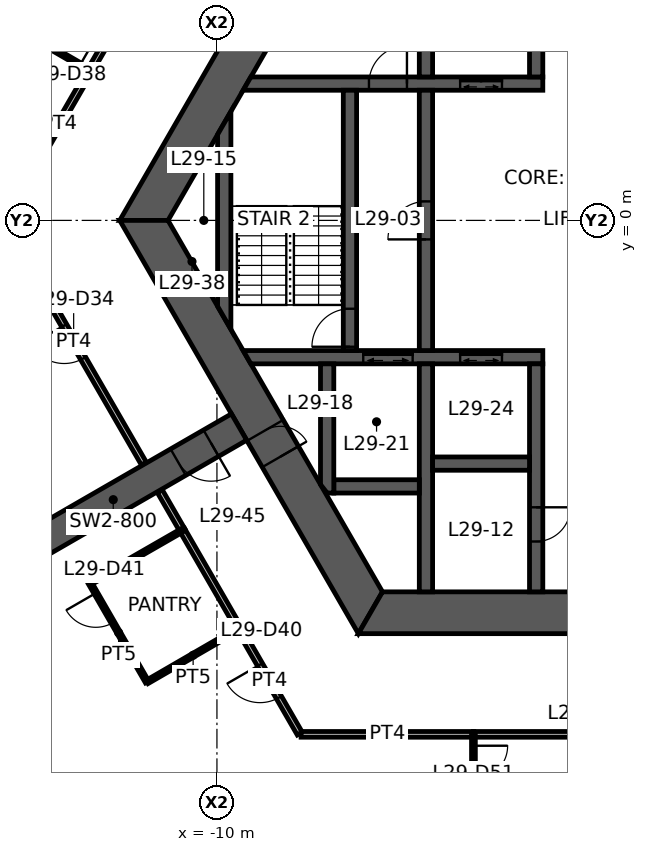
"""IFC4 building model, lengths in metres.
Left out: names, types, materials, properties, quantities, classifications, styles, units other than length and angle.
Written with IfcOpenShell. Run it as: python <this file> out.ifc"""

import sys

from ifc_helpers import new_model, si_unit, direction, frame, frame_2d, origin, place, context, subcontext, project, spatial, polyline, rectangle, outline, extrude, element, fill, save


model = new_model("IFC4")
c1 = context("Model", 3, precision=1e-05, world=origin(), true_north=direction((0.0, 1.0)))
c2 = subcontext(c1, "Body", "Model", "MODEL_VIEW")
j1 = project(units=[si_unit("LENGTHUNIT", "METRE"), si_unit("PLANEANGLEUNIT", "RADIAN")], contexts=[c1])
p1 = place(None, origin())
s1 = spatial("IfcSite", under=j1, at=p1, CompositionType="ELEMENT")
p2 = place(p1, origin())
s2 = spatial("IfcBuilding", under=s1, at=p2, CompositionType="ELEMENT")
p3 = place(p2, frame((0.0, 0.0, 115.8)))
s3 = spatial("IfcBuildingStorey", under=s2, at=p3, CompositionType="ELEMENT", Elevation=115.8)
p4 = place(p3, frame((-5.961, 10.325, 0.0), z_axis=(0.0, 0.0, 1.0), x_axis=(-0.500004296715, -0.866022923061, 0.0)))
e1 = element("IfcWall", 1, at=p4, inside=s3, PredefinedType="SHEAR", context=c2, shape_type="SweptSolid", body=[
    extrude(outline(polyline([(-0.318, -0.55), (4.494, -0.55), (5.494, -0.55), (12.24, -0.55), (11.605, 0.55), (5.494, 0.55), (4.494, 0.55), (0.318, 0.55), (-0.318, -0.55)])), origin(), (0.0, 0.0, 1.0), 3.9),
])
p5 = place(p4, frame((4.494, 0.0, 0.0)))
e2 = element("IfcOpeningElement", 2, at=p5, cuts=e1, PredefinedType="OPENING", context=c2, shape_type="SweptSolid", body=[
    extrude(rectangle(XDim=1.0, YDim=2.1, at=frame_2d((0.5, 1.05))), frame((0.0, 0.56, 0.0), z_axis=(0.0, -1.0, 0.0), x_axis=(1.0, 0.0, 0.0)), (0.0, 0.0, 1.0), 1.12),
])
p6 = place(p3, frame((-11.922, 0.0, 0.0), z_axis=(0.0, 0.0, 1.0), x_axis=(0.500004296715, -0.866022923061, 0.0)))
e3 = element("IfcWall", 3, at=p6, inside=s3, PredefinedType="SHEAR", context=c2, shape_type="SweptSolid", body=[
    extrude(outline(polyline([(-0.318, -0.55), (6.381, -0.55), (7.181, -0.55), (12.24, -0.55), (11.605, 0.55), (7.181, 0.55), (6.381, 0.55), (0.318, 0.55), (-0.318, -0.55)])), origin(), (0.0, 0.0, 1.0), 3.9),
])
p7 = place(p6, frame((6.381, 0.0, 0.0)))
e4 = element("IfcOpeningElement", 4, at=p7, cuts=e3, PredefinedType="OPENING", context=c2, shape_type="SweptSolid", body=[
    extrude(rectangle(XDim=0.8, YDim=2.1, at=frame_2d((0.4, 1.05))), frame((0.0, 0.56, 0.0), z_axis=(0.0, -1.0, 0.0), x_axis=(1.0, 0.0, 0.0)), (0.0, 0.0, 1.0), 1.12),
])
p8 = place(p3, frame((-5.961, -10.325, 0.0), z_axis=(0.0, 0.0, 1.0), x_axis=(1.0, 0.0, 0.0)))
e5 = element("IfcWall", 5, at=p8, inside=s3, PredefinedType="SHEAR", context=c2, shape_type="SweptSolid", body=[
    extrude(outline(polyline([(-0.318, -0.55), (5.461, -0.55), (6.461, -0.55), (12.24, -0.55), (11.605, 0.55), (6.461, 0.55), (5.461, 0.55), (0.318, 0.55), (-0.318, -0.55)])), origin(), (0.0, 0.0, 1.0), 3.9),
])
p9 = place(p8, frame((5.461, 0.0, 0.0)))
e6 = element("IfcOpeningElement", 6, at=p9, cuts=e5, PredefinedType="OPENING", context=c2, shape_type="SweptSolid", body=[
    extrude(rectangle(XDim=1.0, YDim=2.1, at=frame_2d((0.5, 1.05))), frame((0.0, 0.56, 0.0), z_axis=(0.0, -1.0, 0.0), x_axis=(1.0, 0.0, 0.0)), (0.0, 0.0, 1.0), 1.12),
])
p10 = place(p3, frame((-9.418, -5.438, 0.0), z_axis=(0.0, 0.0, 1.0), x_axis=(-0.866029782078, -0.499992416496, 0.0)))
e7 = element("IfcWall", 7, at=p10, inside=s3, PredefinedType="SHEAR", context=c2, shape_type="SweptSolid", body=[
    extrude(rectangle(XDim=7.646, YDim=0.8, at=frame_2d((3.823, 0.0))), origin(), (0.0, 0.0, 1.0), 3.9),
])
p11 = place(p10, frame((0.85, 0.0, 0.0)))
e8 = element("IfcOpeningElement", 8, at=p11, cuts=e7, PredefinedType="OPENING", context=c2, shape_type="SweptSolid", body=[
    extrude(rectangle(XDim=1.0, YDim=2.1, at=frame_2d((0.5, 1.05))), frame((0.0, 0.41, 0.0), z_axis=(0.0, -1.0, 0.0), x_axis=(1.0, 0.0, 0.0)), (0.0, 0.0, 1.0), 0.82),
])
p12 = place(p3, frame((-9.209, 3.6, 0.0), z_axis=(0.0, 0.0, 1.0), x_axis=(1.0, 0.0, 0.0)))
e9 = element("IfcWall", 9, at=p12, inside=s3, PredefinedType="SHEAR", context=c2, shape_type="SweptSolid", body=[
    extrude(outline(polyline([(-0.101, -0.175), (3.209, -0.175), (4.209, -0.175), (5.609, -0.175), (6.709, -0.175), (7.784, -0.175), (7.784, 0.175), (6.709, 0.175), (5.609, 0.175), (4.209, 0.175), (3.209, 0.175), (0.101, 0.175), (-0.101, -0.175)])), origin(), (0.0, 0.0, 1.0), 3.9),
])
p13 = place(p12, frame((3.209, 0.0, 0.0)))
e10 = element("IfcOpeningElement", 10, at=p13, cuts=e9, PredefinedType="OPENING", context=c2, shape_type="SweptSolid", body=[
    extrude(rectangle(XDim=1.0, YDim=2.1, at=frame_2d((0.5, 1.05))), frame((0.0, 0.185, 0.0), z_axis=(0.0, -1.0, 0.0), x_axis=(1.0, 0.0, 0.0)), (0.0, 0.0, 1.0), 0.37),
])
p14 = place(p12, frame((5.609, 0.0, 0.0)))
e11 = element("IfcOpeningElement", 11, at=p14, cuts=e9, PredefinedType="OPENING", context=c2, shape_type="SweptSolid", body=[
    extrude(rectangle(XDim=1.1, YDim=2.1, at=frame_2d((0.55, 1.05))), frame((0.0, 0.185, 0.0), z_axis=(0.0, -1.0, 0.0), x_axis=(1.0, 0.0, 0.0)), (0.0, 0.0, 1.0), 0.37),
])
p15 = place(p3, frame((-9.209, -3.6, 0.0), z_axis=(0.0, 0.0, 1.0), x_axis=(1.0, 0.0, 0.0)))
e12 = element("IfcWall", 12, at=p15, inside=s3, PredefinedType="SHEAR", context=c2, shape_type="SweptSolid", body=[
    extrude(outline(polyline([(0.101, -0.175), (3.059, -0.175), (4.359, -0.175), (5.609, -0.175), (6.709, -0.175), (7.784, -0.175), (7.784, 0.175), (6.709, 0.175), (5.609, 0.175), (4.359, 0.175), (3.059, 0.175), (-0.101, 0.175), (0.101, -0.175)])), origin(), (0.0, 0.0, 1.0), 3.9),
])
p16 = place(p15, frame((5.609, 0.0, 0.0)))
e13 = element("IfcOpeningElement", 13, at=p16, cuts=e12, PredefinedType="OPENING", context=c2, shape_type="SweptSolid", body=[
    extrude(rectangle(XDim=1.1, YDim=2.1, at=frame_2d((0.55, 1.05))), frame((0.0, 0.185, 0.0), z_axis=(0.0, -1.0, 0.0), x_axis=(1.0, 0.0, 0.0)), (0.0, 0.0, 1.0), 0.37),
])
p17 = place(p15, frame((3.059, 0.0, 0.0)))
e14 = element("IfcOpeningElement", 14, at=p17, cuts=e12, PredefinedType="OPENING", context=c2, shape_type="SweptSolid", body=[
    extrude(rectangle(XDim=1.3, YDim=2.1, at=frame_2d((0.65, 1.05))), frame((0.0, 0.185, 0.0), z_axis=(0.0, -1.0, 0.0), x_axis=(1.0, 0.0, 0.0)), (0.0, 0.0, 1.0), 0.37),
])
p18 = place(p3, frame((-1.6, 3.775, 0.0), z_axis=(0.0, 0.0, 1.0), x_axis=(0.0, 1.0, 0.0)))
e15 = element("IfcWall", 15, at=p18, inside=s3, PredefinedType="SHEAR", context=c2, shape_type="SweptSolid", body=[
    extrude(rectangle(XDim=6.0, YDim=0.35, at=frame_2d((3.0, 0.0))), origin(), (0.0, 0.0, 1.0), 3.9),
])
p19 = place(p18, frame((3.775, 0.0, 0.0)))
e16 = element("IfcOpeningElement", 16, at=p19, cuts=e15, PredefinedType="OPENING", context=c2, shape_type="SweptSolid", body=[
    extrude(rectangle(XDim=0.9, YDim=2.1, at=frame_2d((0.45, 1.05))), frame((0.0, 0.185, 0.0), z_axis=(0.0, -1.0, 0.0), x_axis=(1.0, 0.0, 0.0)), (0.0, 0.0, 1.0), 0.37),
])
p20 = place(p3, frame((-1.6, -3.775, 0.0), z_axis=(0.0, 0.0, 1.0), x_axis=(0.0, -1.0, 0.0)))
e17 = element("IfcWall", 17, at=p20, inside=s3, PredefinedType="SHEAR", context=c2, shape_type="SweptSolid", body=[
    extrude(rectangle(XDim=6.0, YDim=0.35, at=frame_2d((3.0, 0.0))), origin(), (0.0, 0.0, 1.0), 3.9),
])
p21 = place(p20, frame((3.775, 0.0, 0.0)))
e18 = element("IfcOpeningElement", 18, at=p21, cuts=e17, PredefinedType="OPENING", context=c2, shape_type="SweptSolid", body=[
    extrude(rectangle(XDim=0.9, YDim=2.1, at=frame_2d((0.45, 1.05))), frame((0.0, 0.185, 0.0), z_axis=(0.0, -1.0, 0.0), x_axis=(1.0, 0.0, 0.0)), (0.0, 0.0, 1.0), 0.37),
])
p22 = place(p3, frame((-4.5, -3.425, 0.0), z_axis=(0.0, 0.0, 1.0), x_axis=(0.0, 1.0, 0.0)))
e19 = element("IfcWall", 19, at=p22, inside=s3, PredefinedType="SHEAR", context=c2, shape_type="SweptSolid", body=[
    extrude(rectangle(XDim=6.85, YDim=0.35, at=frame_2d((3.425, 0.0))), origin(), (0.0, 0.0, 1.0), 3.9),
])
p23 = place(p22, frame((2.925, 0.0, 0.0)))
e20 = element("IfcOpeningElement", 20, at=p23, cuts=e19, PredefinedType="OPENING", context=c2, shape_type="SweptSolid", body=[
    extrude(rectangle(XDim=1.0, YDim=2.1, at=frame_2d((0.5, 1.05))), frame((0.0, 0.185, 0.0), z_axis=(0.0, -1.0, 0.0), x_axis=(1.0, 0.0, 0.0)), (0.0, 0.0, 1.0), 0.37),
])
p24 = place(p3, frame((-6.5, -3.425, 0.0), z_axis=(0.0, 0.0, 1.0), x_axis=(0.0, 1.0, 0.0)))
e21 = element("IfcWall", 21, at=p24, inside=s3, PredefinedType="SHEAR", context=c2, shape_type="SweptSolid", body=[
    extrude(rectangle(XDim=6.85, YDim=0.35, at=frame_2d((3.425, 0.0))), origin(), (0.0, 0.0, 1.0), 3.9),
])
p25 = place(p24, frame((0.1, 0.0, 0.0)))
e22 = element("IfcOpeningElement", 22, at=p25, cuts=e21, PredefinedType="OPENING", context=c2, shape_type="SweptSolid", body=[
    extrude(rectangle(XDim=1.0, YDim=2.1, at=frame_2d((0.5, 1.05))), frame((0.0, 0.185, 0.0), z_axis=(0.0, -1.0, 0.0), x_axis=(1.0, 0.0, 0.0)), (0.0, 0.0, 1.0), 0.37),
])
for number, where, z_axis, x_axis in (
    (23, (-4.5, 3.775, 0.0), (0.0, 0.0, 1.0), (0.0, 1.0, 0.0)),
    (24, (-4.5, -3.775, 0.0), (0.0, 0.0, 1.0), (0.0, -1.0, 0.0)),
):
    element("IfcWall", number, at=place(p3, frame(where, z_axis=z_axis, x_axis=x_axis)), inside=s3, PredefinedType="SHEAR", context=c2, shape_type="SweptSolid", body=[
        extrude(rectangle(XDim=6.0, YDim=0.35, at=frame_2d((3.0, 0.0))), origin(), (0.0, 0.0, 1.0), 3.9),
    ])
p26 = place(p3, frame((-4.325, -6.4, 0.0), z_axis=(0.0, 0.0, 1.0), x_axis=(1.0, 0.0, 0.0)))
e25 = element("IfcWall", 25, at=p26, inside=s3, PredefinedType="SHEAR", context=c2, shape_type="SweptSolid", body=[
    extrude(rectangle(XDim=2.55, YDim=0.35, at=frame_2d((1.275, 0.0))), origin(), (0.0, 0.0, 1.0), 3.9),
])
p27 = place(p3, frame((-6.925, -7.0, 0.0), z_axis=(0.0, 0.0, 1.0), x_axis=(1.0, 0.0, 0.0)))
e26 = element("IfcWall", 26, at=p27, inside=s3, PredefinedType="SHEAR", context=c2, shape_type="SweptSolid", body=[
    extrude(rectangle(XDim=2.25, YDim=0.35, at=frame_2d((1.125, 0.0))), origin(), (0.0, 0.0, 1.0), 3.9),
])
p28 = place(p3, frame((-7.1, -3.775, 0.0), z_axis=(0.0, 0.0, 1.0), x_axis=(0.0, -1.0, 0.0)))
e27 = element("IfcWall", 27, at=p28, inside=s3, PredefinedType="SHEAR", context=c2, shape_type="SweptSolid", body=[
    extrude(outline(polyline([(0.0, -0.175), (3.175, -0.175), (3.4, 0.0), (3.4, 0.175), (0.0, 0.175), (0.0, -0.175)])), origin(), (0.0, 0.0, 1.0), 3.9),
])
p29 = place(p3, frame((-9.808, -2.562, 0.0), z_axis=(0.0, 0.0, 1.0), x_axis=(0.0, 1.0, 0.0)))
e28 = element("IfcWall", 28, at=p29, inside=s3, PredefinedType="SHEAR", context=c2, shape_type="SweptSolid", body=[
    extrude(outline(polyline([(-0.303, -0.175), (5.428, -0.175), (4.821, 0.175), (0.303, 0.175), (-0.303, -0.175)])), origin(), (0.0, 0.0, 1.0), 3.9),
])
p30 = place(p3, frame((-14.962, 1.135, 0.0), z_axis=(0.0, 0.0, 1.0), x_axis=(0.500001520505, 0.866024525919, 0.0)))
e29 = element("IfcWall", 29, at=p30, inside=s3, PredefinedType="PARTITIONING", context=c2, shape_type="SweptSolid", body=[
    extrude(rectangle(XDim=3.256, YDim=0.15, at=frame_2d((1.628, 0.0))), origin(), (0.0, 0.0, 1.0), 2.95),
])
p31 = place(p3, frame((-11.923, -6.399, 0.0), z_axis=(0.0, 0.0, 1.0), x_axis=(-0.499980837837, 0.866036466782, 0.0)))
e30 = element("IfcWall", 30, at=p31, inside=s3, PredefinedType="PARTITIONING", context=c2, shape_type="SweptSolid", body=[
    extrude(rectangle(XDim=7.388, YDim=0.15, at=frame_2d((3.694, 0.0))), origin(), (0.0, 0.0, 1.0), 2.95),
])
p32 = place(p31, frame((3.194, 0.0, 0.0)))
e31 = element("IfcOpeningElement", 31, at=p32, cuts=e30, PredefinedType="OPENING", context=c2, shape_type="SweptSolid", body=[
    extrude(rectangle(XDim=1.0, YDim=2.1, at=frame_2d((0.5, 1.05))), frame((0.0, 0.085, 0.0), z_axis=(0.0, -1.0, 0.0), x_axis=(1.0, 0.0, 0.0)), (0.0, 0.0, 1.0), 0.17),
])
p33 = place(p3, frame((-13.338, 3.947, 0.0), z_axis=(0.0, 0.0, 1.0), x_axis=(0.49998791073, 0.866032383415, 0.0)))
e32 = element("IfcWall", 32, at=p33, inside=s3, PredefinedType="PARTITIONING", context=c2, shape_type="SweptSolid", body=[
    extrude(rectangle(XDim=6.502, YDim=0.15, at=frame_2d((3.251, 0.0))), origin(), (0.0, 0.0, 1.0), 2.95),
])
p34 = place(p33, frame((2.751, 0.0, 0.0)))
e33 = element("IfcOpeningElement", 33, at=p34, cuts=e32, PredefinedType="OPENING", context=c2, shape_type="SweptSolid", body=[
    extrude(rectangle(XDim=1.0, YDim=2.1, at=frame_2d((0.5, 1.05))), frame((0.0, 0.085, 0.0), z_axis=(0.0, -1.0, 0.0), x_axis=(1.0, 0.0, 0.0)), (0.0, 0.0, 1.0), 0.17),
])
p35 = place(p3, frame((-17.056, 6.099, 0.0), z_axis=(0.0, 0.0, 1.0), x_axis=(0.865505397626, -0.500899597405, 0.0)))
e34 = element("IfcWall", 34, at=p35, inside=s3, PredefinedType="PARTITIONING", context=c2, shape_type="SweptSolid", body=[
    extrude(rectangle(XDim=4.295, YDim=0.1, at=frame_2d((2.148, 0.0))), origin(), (0.0, 0.0, 1.0), 2.95),
])
p36 = place(p35, frame((3.095, 0.0, 0.0)))
e35 = element("IfcOpeningElement", 35, at=p36, cuts=e34, PredefinedType="OPENING", context=c2, shape_type="SweptSolid", body=[
    extrude(rectangle(XDim=0.9, YDim=2.1, at=frame_2d((0.45, 1.05))), frame((0.0, 0.06, 0.0), z_axis=(0.0, -1.0, 0.0), x_axis=(1.0, 0.0, 0.0)), (0.0, 0.0, 1.0), 0.12),
])
p37 = place(p3, frame((-9.41, -10.75, 0.0), z_axis=(0.0, 0.0, 1.0), x_axis=(-0.500038395149, 0.8660032352, 0.0)))
e36 = element("IfcWall", 36, at=p37, inside=s3, PredefinedType="PARTITIONING", context=c2, shape_type="SweptSolid", body=[
    extrude(rectangle(XDim=3.01, YDim=0.15, at=frame_2d((1.505, 0.0))), origin(), (0.0, 0.0, 1.0), 2.95),
])
p38 = place(p3, frame((-10.911, -8.152, 0.0), z_axis=(0.0, 0.0, 1.0), x_axis=(-0.499841408252, 0.866116947413, 0.0)))
e37 = element("IfcWall", 37, at=p38, inside=s3, PredefinedType="PARTITIONING", context=c2, shape_type="SweptSolid", body=[
    extrude(rectangle(XDim=1.185, YDim=0.15, at=frame_2d((0.592, 0.0))), origin(), (0.0, 0.0, 1.0), 2.95),
])
p39 = place(p3, frame((-7.82, -13.505, 0.0), z_axis=(0.0, 0.0, 1.0), x_axis=(-0.499983030129, 0.866035201123, 0.0)))
e38 = element("IfcWall", 38, at=p39, inside=s3, PredefinedType="PARTITIONING", context=c2, shape_type="SweptSolid", body=[
    extrude(rectangle(XDim=3.19, YDim=0.15, at=frame_2d((1.595, 0.0))), origin(), (0.0, 0.0, 1.0), 2.95),
])
p40 = place(p39, frame((1.095, 0.0, 0.0)))
e39 = element("IfcOpeningElement", 39, at=p40, cuts=e38, PredefinedType="OPENING", context=c2, shape_type="SweptSolid", body=[
    extrude(rectangle(XDim=1.0, YDim=2.1, at=frame_2d((0.5, 1.05))), frame((0.0, 0.085, 0.0), z_axis=(0.0, -1.0, 0.0), x_axis=(1.0, 0.0, 0.0)), (0.0, 0.0, 1.0), 0.17),
])
p41 = place(p3, frame((-13.338, -9.548, 0.0), z_axis=(0.0, 0.0, 1.0), x_axis=(0.866833758708, 0.498597267105, 0.0)))
e40 = element("IfcWall", 40, at=p41, inside=s3, PredefinedType="PARTITIONING", context=c2, shape_type="SweptSolid", body=[
    extrude(rectangle(XDim=2.8, YDim=0.1, at=frame_2d((1.4, 0.0))), origin(), (0.0, 0.0, 1.0), 2.95),
])
p42 = place(p3, frame((-11.838, -12.146, 0.0), z_axis=(0.0, 0.0, 1.0), x_axis=(-0.499990139034, 0.866031096941, 0.0)))
e41 = element("IfcWall", 41, at=p42, inside=s3, PredefinedType="PARTITIONING", context=c2, shape_type="SweptSolid", body=[
    extrude(rectangle(XDim=3.0, YDim=0.1, at=frame_2d((1.5, 0.0))), origin(), (0.0, 0.0, 1.0), 2.95),
])
p43 = place(p42, frame((1.8, 0.0, 0.0)))
e42 = element("IfcOpeningElement", 42, at=p43, cuts=e41, PredefinedType="OPENING", context=c2, shape_type="SweptSolid", body=[
    extrude(rectangle(XDim=0.9, YDim=2.1, at=frame_2d((0.45, 1.05))), frame((0.0, 0.06, 0.0), z_axis=(0.0, -1.0, 0.0), x_axis=(1.0, 0.0, 0.0)), (0.0, 0.0, 1.0), 0.12),
])
p44 = place(p3, frame((-9.415, -10.742, 0.0), z_axis=(0.0, 0.0, 1.0), x_axis=(-0.865195372903, -0.501434907746, 0.0)))
e43 = element("IfcWall", 43, at=p44, inside=s3, PredefinedType="PARTITIONING", context=c2, shape_type="SweptSolid", body=[
    extrude(rectangle(XDim=2.8, YDim=0.1, at=frame_2d((1.4, 0.0))), origin(), (0.0, 0.0, 1.0), 2.95),
])
p45 = place(p3, frame((-3.241, -13.525, 0.0), z_axis=(0.0, 0.0, 1.0), x_axis=(-1.0, 0.0, 0.0)))
e44 = element("IfcWall", 44, at=p45, inside=s3, PredefinedType="PARTITIONING", context=c2, shape_type="SweptSolid", body=[
    extrude(rectangle(XDim=4.544, YDim=0.15, at=frame_2d((2.272, 0.0))), origin(), (0.0, 0.0, 1.0), 2.95),
])
p46 = place(p3, frame((3.251, -13.525, 0.0), z_axis=(0.0, 0.0, 1.0), x_axis=(-1.0, 0.0, 0.0)))
e45 = element("IfcWall", 45, at=p46, inside=s3, PredefinedType="PARTITIONING", context=c2, shape_type="SweptSolid", body=[
    extrude(rectangle(XDim=6.502, YDim=0.15, at=frame_2d((3.251, 0.0))), origin(), (0.0, 0.0, 1.0), 2.95),
])
p47 = place(p46, frame((2.751, 0.0, 0.0)))
e46 = element("IfcOpeningElement", 46, at=p47, cuts=e45, PredefinedType="OPENING", context=c2, shape_type="SweptSolid", body=[
    extrude(rectangle(XDim=1.0, YDim=2.1, at=frame_2d((0.5, 1.05))), frame((0.0, 0.085, 0.0), z_axis=(0.0, -1.0, 0.0), x_axis=(1.0, 0.0, 0.0)), (0.0, 0.0, 1.0), 0.17),
])
p48 = place(p3, frame((-3.251, -13.525, 0.0), z_axis=(0.0, 0.0, 1.0), x_axis=(0.00107362768, -0.999999423662, 0.0)))
e47 = element("IfcWall", 47, at=p48, inside=s3, PredefinedType="PARTITIONING", context=c2, shape_type="SweptSolid", body=[
    extrude(rectangle(XDim=4.321, YDim=0.1, at=frame_2d((2.16, 0.0))), origin(), (0.0, 0.0, 1.0), 2.95),
])
p49 = place(p48, frame((0.3, 0.0, 0.0)))
e48 = element("IfcOpeningElement", 48, at=p49, cuts=e47, PredefinedType="OPENING", context=c2, shape_type="SweptSolid", body=[
    extrude(rectangle(XDim=0.9, YDim=2.1, at=frame_2d((0.45, 1.05))), frame((0.0, 0.06, 0.0), z_axis=(0.0, -1.0, 0.0), x_axis=(1.0, 0.0, 0.0)), (0.0, 0.0, 1.0), 0.12),
])
p50 = place(p7, origin())
e49 = element("IfcDoor", 49, at=p50, inside=s3, OperationType="SINGLE_SWING_RIGHT", PredefinedType="DOOR", context=c2, shape_type="SweptSolid", body=[
    extrude(rectangle(XDim=0.8, YDim=2.1, at=frame_2d((0.4, 1.05))), frame((0.0, 0.025, 0.0), z_axis=(0.0, -1.0, 0.0), x_axis=(1.0, 0.0, 0.0)), (0.0, 0.0, 1.0), 0.05),
])
fill(e4, e49)
p51 = place(p23, origin())
e50 = element("IfcDoor", 50, at=p51, inside=s3, OperationType="SINGLE_SWING_LEFT", PredefinedType="DOOR", context=c2, shape_type="SweptSolid", body=[
    extrude(rectangle(XDim=1.0, YDim=2.1, at=frame_2d((0.5, 1.05))), frame((0.0, 0.025, 0.0), z_axis=(0.0, -1.0, 0.0), x_axis=(1.0, 0.0, 0.0)), (0.0, 0.0, 1.0), 0.05),
])
fill(e20, e50)
p52 = place(p25, origin())
e51 = element("IfcDoor", 51, at=p52, inside=s3, OperationType="SINGLE_SWING_LEFT", PredefinedType="DOOR", context=c2, shape_type="SweptSolid", body=[
    extrude(rectangle(XDim=1.0, YDim=2.1, at=frame_2d((0.5, 1.05))), frame((0.0, 0.025, 0.0), z_axis=(0.0, -1.0, 0.0), x_axis=(1.0, 0.0, 0.0)), (0.0, 0.0, 1.0), 0.05),
])
fill(e22, e51)
p53 = place(p13, origin())
e52 = element("IfcDoor", 52, at=p53, inside=s3, OperationType="SINGLE_SWING_RIGHT", PredefinedType="DOOR", context=c2, shape_type="SweptSolid", body=[
    extrude(rectangle(XDim=1.0, YDim=2.1, at=frame_2d((0.5, 1.05))), frame((0.0, 0.025, 0.0), z_axis=(0.0, -1.0, 0.0), x_axis=(1.0, 0.0, 0.0)), (0.0, 0.0, 1.0), 0.05),
])
fill(e10, e52)
p54 = place(p21, origin())
e53 = element("IfcDoor", 53, at=p54, inside=s3, OperationType="SINGLE_SWING_LEFT", PredefinedType="DOOR", context=c2, shape_type="SweptSolid", body=[
    extrude(rectangle(XDim=0.9, YDim=2.1, at=frame_2d((0.45, 1.05))), frame((0.0, 0.025, 0.0), z_axis=(0.0, -1.0, 0.0), x_axis=(1.0, 0.0, 0.0)), (0.0, 0.0, 1.0), 0.05),
])
fill(e18, e53)
p55 = place(p11, origin())
e54 = element("IfcDoor", 54, at=p55, inside=s3, OperationType="SINGLE_SWING_LEFT", PredefinedType="DOOR", context=c2, shape_type="SweptSolid", body=[
    extrude(rectangle(XDim=1.0, YDim=2.1, at=frame_2d((0.5, 1.05))), frame((0.0, 0.025, 0.0), z_axis=(0.0, -1.0, 0.0), x_axis=(1.0, 0.0, 0.0)), (0.0, 0.0, 1.0), 0.05),
])
fill(e8, e54)
p56 = place(p32, origin())
e55 = element("IfcDoor", 55, at=p56, inside=s3, OperationType="SINGLE_SWING_RIGHT", PredefinedType="DOOR", context=c2, shape_type="SweptSolid", body=[
    extrude(rectangle(XDim=1.0, YDim=2.1, at=frame_2d((0.5, 1.05))), frame((0.0, 0.025, 0.0), z_axis=(0.0, -1.0, 0.0), x_axis=(1.0, 0.0, 0.0)), (0.0, 0.0, 1.0), 0.05),
])
fill(e31, e55)
p57 = place(p36, origin())
e56 = element("IfcDoor", 56, at=p57, inside=s3, OperationType="SINGLE_SWING_RIGHT", PredefinedType="DOOR", context=c2, shape_type="SweptSolid", body=[
    extrude(rectangle(XDim=0.9, YDim=2.1, at=frame_2d((0.45, 1.05))), frame((0.0, 0.025, 0.0), z_axis=(0.0, -1.0, 0.0), x_axis=(1.0, 0.0, 0.0)), (0.0, 0.0, 1.0), 0.05),
])
fill(e35, e56)
p58 = place(p40, origin())
e57 = element("IfcDoor", 57, at=p58, inside=s3, OperationType="SINGLE_SWING_RIGHT", PredefinedType="DOOR", context=c2, shape_type="SweptSolid", body=[
    extrude(rectangle(XDim=1.0, YDim=2.1, at=frame_2d((0.5, 1.05))), frame((0.0, 0.025, 0.0), z_axis=(0.0, -1.0, 0.0), x_axis=(1.0, 0.0, 0.0)), (0.0, 0.0, 1.0), 0.05),
])
fill(e39, e57)
p59 = place(p43, origin())
e58 = element("IfcDoor", 58, at=p59, inside=s3, OperationType="SINGLE_SWING_RIGHT", PredefinedType="DOOR", context=c2, shape_type="SweptSolid", body=[
    extrude(rectangle(XDim=0.9, YDim=2.1, at=frame_2d((0.45, 1.05))), frame((0.0, 0.025, 0.0), z_axis=(0.0, -1.0, 0.0), x_axis=(1.0, 0.0, 0.0)), (0.0, 0.0, 1.0), 0.05),
])
fill(e42, e58)
p60 = place(p49, origin())
e59 = element("IfcDoor", 59, at=p60, inside=s3, OperationType="SINGLE_SWING_LEFT", PredefinedType="DOOR", context=c2, shape_type="SweptSolid", body=[
    extrude(rectangle(XDim=0.9, YDim=2.1, at=frame_2d((0.45, 1.05))), frame((0.0, 0.025, 0.0), z_axis=(0.0, -1.0, 0.0), x_axis=(1.0, 0.0, 0.0)), (0.0, 0.0, 1.0), 0.05),
])
fill(e48, e59)
p61 = place(p14, origin())
e60 = element("IfcDoor", 60, at=p61, inside=s3, OperationType="DOUBLE_DOOR_SLIDING", PredefinedType="DOOR", context=c2, shape_type="SweptSolid", body=[
    extrude(rectangle(XDim=1.1, YDim=2.1, at=frame_2d((0.55, 1.05))), frame((0.0, 0.025, 0.0), z_axis=(0.0, -1.0, 0.0), x_axis=(1.0, 0.0, 0.0)), (0.0, 0.0, 1.0), 0.05),
])
fill(e11, e60)
p62 = place(p16, origin())
e61 = element("IfcDoor", 61, at=p62, inside=s3, OperationType="DOUBLE_DOOR_SLIDING", PredefinedType="DOOR", context=c2, shape_type="SweptSolid", body=[
    extrude(rectangle(XDim=1.1, YDim=2.1, at=frame_2d((0.55, 1.05))), frame((0.0, 0.025, 0.0), z_axis=(0.0, -1.0, 0.0), x_axis=(1.0, 0.0, 0.0)), (0.0, 0.0, 1.0), 0.05),
])
fill(e13, e61)
p63 = place(p17, origin())
e62 = element("IfcDoor", 62, at=p63, inside=s3, OperationType="DOUBLE_DOOR_SLIDING", PredefinedType="DOOR", context=c2, shape_type="SweptSolid", body=[
    extrude(rectangle(XDim=1.3, YDim=2.1, at=frame_2d((0.65, 1.05))), frame((0.0, 0.025, 0.0), z_axis=(0.0, -1.0, 0.0), x_axis=(1.0, 0.0, 0.0)), (0.0, 0.0, 1.0), 0.05),
])
fill(e14, e62)
save(model, sys.argv[1])
